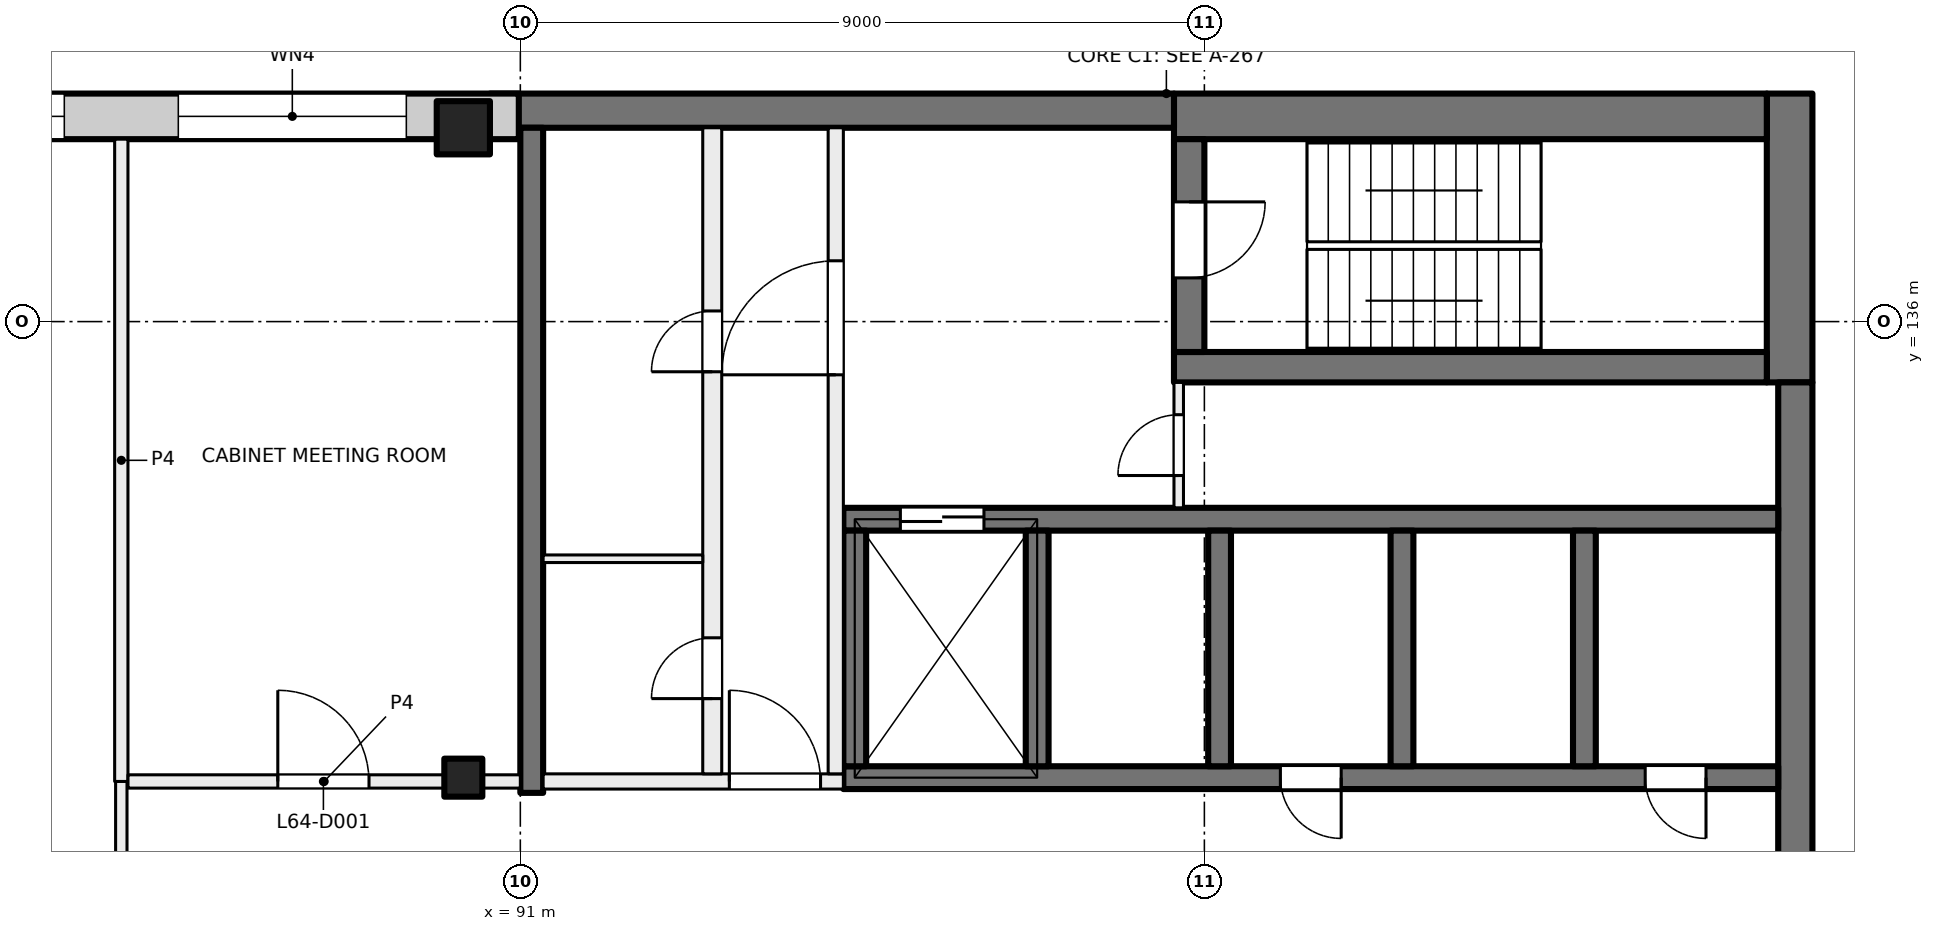
"""IFC4 building model, lengths in metres.
Left out: names, types, materials, properties, quantities, classifications, styles, units other than length and angle.
Written with IfcOpenShell. Run it as: python <this file> out.ifc"""

import sys

from ifc_helpers import new_model, si_unit, direction, frame, frame_2d, origin, origin_2d, place, context, subcontext, project, spatial, rectangle, extrude, element, fill, save


model = new_model("IFC4")
c1 = context("Model", 3, precision=1e-05, world=origin(), true_north=direction((0.0, 1.0)))
c2 = subcontext(c1, "Body", "Model", "MODEL_VIEW")
j1 = project(units=[si_unit("LENGTHUNIT", "METRE"), si_unit("PLANEANGLEUNIT", "RADIAN")], contexts=[c1])
p1 = place(None, origin())
s1 = spatial("IfcSite", under=j1, at=p1, CompositionType="ELEMENT")
p2 = place(p1, origin())
s2 = spatial("IfcBuilding", under=s1, at=p2, CompositionType="ELEMENT")
p3 = place(p2, frame((0.0, 0.0, 269.5)))
s3 = spatial("IfcBuildingStorey", under=s2, at=p3, CompositionType="ELEMENT", Elevation=269.5)
p4 = place(p3, frame((90.25, 130.0, 0.0), z_axis=(0.0, 0.0, 1.0), x_axis=(1.0, 0.0, 0.0)))
e1 = element("IfcColumn", 1, at=p4, inside=s3, PredefinedType="COLUMN", context=c2, shape_type="SweptSolid", body=[
    extrude(rectangle(XDim=0.5, YDim=0.5, at=origin_2d()), origin(), (0.0, 0.0, 1.0), 4.0),
])
p5 = place(p3, frame((90.25, 138.55, 0.0), z_axis=(0.0, 0.0, 1.0), x_axis=(1.0, 0.0, 0.0)))
e2 = element("IfcColumn", 2, at=p5, inside=s3, PredefinedType="COLUMN", context=c2, shape_type="SweptSolid", body=[
    extrude(rectangle(XDim=0.7, YDim=0.7, at=origin_2d()), origin(), (0.0, 0.0, 1.0), 4.0),
])
p6 = place(p3, frame((107.7, 139.0, 0.0), z_axis=(0.0, 0.0, 1.0), x_axis=(0.0, -1.0, 0.0)))
e3 = element("IfcWall", 3, at=p6, inside=s3, PredefinedType="SHEAR", context=c2, shape_type="SweptSolid", body=[
    extrude(rectangle(XDim=3.8, YDim=0.6, at=frame_2d((1.9, 0.0))), origin(), (0.0, 0.0, 1.0), 4.0),
])
p7 = place(p3, frame((107.775, 135.2, 0.0), z_axis=(0.0, 0.0, 1.0), x_axis=(0.0, -1.0, 0.0)))
e4 = element("IfcWall", 4, at=p7, inside=s3, PredefinedType="SHEAR", context=c2, shape_type="SweptSolid", body=[
    extrude(rectangle(XDim=14.4, YDim=0.45, at=frame_2d((7.2, 0.0))), origin(), (0.0, 0.0, 1.0), 4.0),
])
p8 = place(p3, frame((107.4, 138.7, 0.0), z_axis=(0.0, 0.0, 1.0), x_axis=(-1.0, 0.0, 0.0)))
e5 = element("IfcWall", 5, at=p8, inside=s3, PredefinedType="SHEAR", context=c2, shape_type="SweptSolid", body=[
    extrude(rectangle(XDim=7.8, YDim=0.6, at=frame_2d((3.9, 0.0))), origin(), (0.0, 0.0, 1.0), 4.0),
])
p9 = place(p3, frame((99.6, 138.775, 0.0), z_axis=(0.0, 0.0, 1.0), x_axis=(-1.0, 0.0, 0.0)))
e6 = element("IfcWall", 6, at=p9, inside=s3, PredefinedType="SHEAR", context=c2, shape_type="SweptSolid", body=[
    extrude(rectangle(XDim=9.0, YDim=0.45, at=frame_2d((4.5, 0.0))), origin(), (0.0, 0.0, 1.0), 4.0),
])
p10 = place(p3, frame((107.4, 135.4, 0.0), z_axis=(0.0, 0.0, 1.0), x_axis=(-1.0, 0.0, 0.0)))
e7 = element("IfcWall", 7, at=p10, inside=s3, PredefinedType="SHEAR", context=c2, shape_type="SweptSolid", body=[
    extrude(rectangle(XDim=7.8, YDim=0.4, at=frame_2d((3.9, 0.0))), origin(), (0.0, 0.0, 1.0), 4.0),
])
p11 = place(p3, frame((99.8, 138.4, 0.0), z_axis=(0.0, 0.0, 1.0), x_axis=(0.0, -1.0, 0.0)))
e8 = element("IfcWall", 8, at=p11, inside=s3, PredefinedType="SHEAR", context=c2, shape_type="SweptSolid", body=[
    extrude(rectangle(XDim=2.8, YDim=0.4, at=frame_2d((1.4, 0.0))), origin(), (0.0, 0.0, 1.0), 4.0),
])
p12 = place(p11, frame((0.825, 0.0, 0.0)))
e9 = element("IfcOpeningElement", 9, at=p12, cuts=e8, PredefinedType="OPENING", context=c2, shape_type="SweptSolid", body=[
    extrude(rectangle(XDim=1.0, YDim=2.1, at=frame_2d((0.5, 1.05))), frame((0.0, 0.21, 0.0), z_axis=(0.0, -1.0, 0.0), x_axis=(1.0, 0.0, 0.0)), (0.0, 0.0, 1.0), 0.42),
])
p13 = place(p3, frame((107.55, 130.0, 0.0), z_axis=(0.0, 0.0, 1.0), x_axis=(-1.0, 0.0, 0.0)))
e10 = element("IfcWall", 10, at=p13, inside=s3, PredefinedType="SHEAR", context=c2, shape_type="SweptSolid", body=[
    extrude(rectangle(XDim=12.3, YDim=0.3, at=frame_2d((6.15, 0.0))), origin(), (0.0, 0.0, 1.0), 4.0),
])
p14 = place(p13, frame((0.95, 0.0, 0.0)))
e11 = element("IfcOpeningElement", 11, at=p14, cuts=e10, PredefinedType="OPENING", context=c2, shape_type="SweptSolid", body=[
    extrude(rectangle(XDim=0.8, YDim=2.1, at=frame_2d((0.4, 1.05))), frame((0.0, 0.16, 0.0), z_axis=(0.0, -1.0, 0.0), x_axis=(1.0, 0.0, 0.0)), (0.0, 0.0, 1.0), 0.32),
])
p15 = place(p13, frame((5.75, 0.0, 0.0)))
e12 = element("IfcOpeningElement", 12, at=p15, cuts=e10, PredefinedType="OPENING", context=c2, shape_type="SweptSolid", body=[
    extrude(rectangle(XDim=0.8, YDim=2.1, at=frame_2d((0.4, 1.05))), frame((0.0, 0.16, 0.0), z_axis=(0.0, -1.0, 0.0), x_axis=(1.0, 0.0, 0.0)), (0.0, 0.0, 1.0), 0.32),
])
p16 = place(p3, frame((107.55, 133.4, 0.0), z_axis=(0.0, 0.0, 1.0), x_axis=(-1.0, 0.0, 0.0)))
e13 = element("IfcWall", 13, at=p16, inside=s3, PredefinedType="SHEAR", context=c2, shape_type="SweptSolid", body=[
    extrude(rectangle(XDim=12.3, YDim=0.3, at=frame_2d((6.15, 0.0))), origin(), (0.0, 0.0, 1.0), 4.0),
])
p17 = place(p16, frame((10.45, 0.0, 0.0)))
e14 = element("IfcOpeningElement", 14, at=p17, cuts=e13, PredefinedType="OPENING", context=c2, shape_type="SweptSolid", body=[
    extrude(rectangle(XDim=1.1, YDim=2.1, at=frame_2d((0.55, 1.05))), frame((0.0, 0.16, 0.0), z_axis=(0.0, -1.0, 0.0), x_axis=(1.0, 0.0, 0.0)), (0.0, 0.0, 1.0), 0.32),
])
for number, where, z_axis, x_axis in (
    (15, (105.0, 133.25, 0.0), (0.0, 0.0, 1.0), (0.0, -1.0, 0.0)),
    (16, (102.6, 133.25, 0.0), (0.0, 0.0, 1.0), (0.0, -1.0, 0.0)),
    (17, (100.2, 133.25, 0.0), (0.0, 0.0, 1.0), (0.0, -1.0, 0.0)),
    (18, (97.8, 133.25, 0.0), (0.0, 0.0, 1.0), (0.0, -1.0, 0.0)),
    (19, (95.4, 133.25, 0.0), (0.0, 0.0, 1.0), (0.0, -1.0, 0.0)),
):
    element("IfcWall", number, at=place(p3, frame(where, z_axis=z_axis, x_axis=x_axis)), inside=s3, PredefinedType="SHEAR", context=c2, shape_type="SweptSolid", body=[
        extrude(rectangle(XDim=3.1, YDim=0.3, at=frame_2d((1.55, 0.0))), origin(), (0.0, 0.0, 1.0), 4.0),
    ])
p18 = place(p3, frame((91.15, 138.55, 0.0), z_axis=(0.0, 0.0, 1.0), x_axis=(0.0, -1.0, 0.0)))
e20 = element("IfcWall", 20, at=p18, inside=s3, PredefinedType="SHEAR", context=c2, shape_type="SweptSolid", body=[
    extrude(rectangle(XDim=8.75, YDim=0.3, at=frame_2d((4.375, 0.0))), origin(), (0.0, 0.0, 1.0), 4.0),
])
p19 = place(p3, frame((47.07, 138.7, 0.0), z_axis=(0.0, 0.0, 1.0), x_axis=(1.0, 0.0, 0.0)))
e21 = element("IfcWall", 21, at=p19, inside=s3, PredefinedType="SOLIDWALL", context=c2, shape_type="SweptSolid", body=[
    extrude(rectangle(XDim=43.91, YDim=0.6, at=frame_2d((21.955, 0.0))), origin(), (0.0, 0.0, 1.0), 3.625),
])
p20 = place(p19, frame((3.43, 0.0, 0.9)))
e22 = element("IfcOpeningElement", 22, at=p20, cuts=e21, PredefinedType="OPENING", context=c2, shape_type="SweptSolid", body=[
    extrude(rectangle(XDim=3.0, YDim=2.4, at=frame_2d((1.5, 1.2))), frame((0.0, 0.31, 0.0), z_axis=(0.0, -1.0, 0.0), x_axis=(1.0, 0.0, 0.0)), (0.0, 0.0, 1.0), 0.62),
])
p21 = place(p19, frame((7.93, 0.0, 0.9)))
e23 = element("IfcOpeningElement", 23, at=p21, cuts=e21, PredefinedType="OPENING", context=c2, shape_type="SweptSolid", body=[
    extrude(rectangle(XDim=3.0, YDim=2.4, at=frame_2d((1.5, 1.2))), frame((0.0, 0.31, 0.0), z_axis=(0.0, -1.0, 0.0), x_axis=(1.0, 0.0, 0.0)), (0.0, 0.0, 1.0), 0.62),
])
p22 = place(p19, frame((12.43, 0.0, 0.9)))
e24 = element("IfcOpeningElement", 24, at=p22, cuts=e21, PredefinedType="OPENING", context=c2, shape_type="SweptSolid", body=[
    extrude(rectangle(XDim=3.0, YDim=2.4, at=frame_2d((1.5, 1.2))), frame((0.0, 0.31, 0.0), z_axis=(0.0, -1.0, 0.0), x_axis=(1.0, 0.0, 0.0)), (0.0, 0.0, 1.0), 0.62),
])
p23 = place(p19, frame((16.93, 0.0, 0.9)))
e25 = element("IfcOpeningElement", 25, at=p23, cuts=e21, PredefinedType="OPENING", context=c2, shape_type="SweptSolid", body=[
    extrude(rectangle(XDim=3.0, YDim=2.4, at=frame_2d((1.5, 1.2))), frame((0.0, 0.31, 0.0), z_axis=(0.0, -1.0, 0.0), x_axis=(1.0, 0.0, 0.0)), (0.0, 0.0, 1.0), 0.62),
])
p24 = place(p19, frame((21.43, 0.0, 0.9)))
e26 = element("IfcOpeningElement", 26, at=p24, cuts=e21, PredefinedType="OPENING", context=c2, shape_type="SweptSolid", body=[
    extrude(rectangle(XDim=3.0, YDim=2.4, at=frame_2d((1.5, 1.2))), frame((0.0, 0.31, 0.0), z_axis=(0.0, -1.0, 0.0), x_axis=(1.0, 0.0, 0.0)), (0.0, 0.0, 1.0), 0.62),
])
p25 = place(p19, frame((25.93, 0.0, 0.9)))
e27 = element("IfcOpeningElement", 27, at=p25, cuts=e21, PredefinedType="OPENING", context=c2, shape_type="SweptSolid", body=[
    extrude(rectangle(XDim=3.0, YDim=2.4, at=frame_2d((1.5, 1.2))), frame((0.0, 0.31, 0.0), z_axis=(0.0, -1.0, 0.0), x_axis=(1.0, 0.0, 0.0)), (0.0, 0.0, 1.0), 0.62),
])
p26 = place(p19, frame((30.43, 0.0, 0.9)))
e28 = element("IfcOpeningElement", 28, at=p26, cuts=e21, PredefinedType="OPENING", context=c2, shape_type="SweptSolid", body=[
    extrude(rectangle(XDim=3.0, YDim=2.4, at=frame_2d((1.5, 1.2))), frame((0.0, 0.31, 0.0), z_axis=(0.0, -1.0, 0.0), x_axis=(1.0, 0.0, 0.0)), (0.0, 0.0, 1.0), 0.62),
])
p27 = place(p19, frame((34.93, 0.0, 0.9)))
e29 = element("IfcOpeningElement", 29, at=p27, cuts=e21, PredefinedType="OPENING", context=c2, shape_type="SweptSolid", body=[
    extrude(rectangle(XDim=3.0, YDim=2.4, at=frame_2d((1.5, 1.2))), frame((0.0, 0.31, 0.0), z_axis=(0.0, -1.0, 0.0), x_axis=(1.0, 0.0, 0.0)), (0.0, 0.0, 1.0), 0.62),
])
p28 = place(p19, frame((39.43, 0.0, 0.9)))
e30 = element("IfcOpeningElement", 30, at=p28, cuts=e21, PredefinedType="OPENING", context=c2, shape_type="SweptSolid", body=[
    extrude(rectangle(XDim=3.0, YDim=2.4, at=frame_2d((1.5, 1.2))), frame((0.0, 0.31, 0.0), z_axis=(0.0, -1.0, 0.0), x_axis=(1.0, 0.0, 0.0)), (0.0, 0.0, 1.0), 0.62),
])
p29 = place(p3, frame((91.3, 129.95, 0.0), z_axis=(0.0, 0.0, 1.0), x_axis=(1.0, 0.0, 0.0)))
e31 = element("IfcWall", 31, at=p29, inside=s3, PredefinedType="PARTITIONING", context=c2, shape_type="SweptSolid", body=[
    extrude(rectangle(XDim=3.95, YDim=0.2, at=frame_2d((1.975, 0.0))), origin(), (0.0, 0.0, 1.0), 3.625),
])
p30 = place(p29, frame((2.45, 0.0, 0.0)))
e32 = element("IfcOpeningElement", 32, at=p30, cuts=e31, PredefinedType="OPENING", context=c2, shape_type="SweptSolid", body=[
    extrude(rectangle(XDim=1.2, YDim=2.1, at=frame_2d((0.6, 1.05))), frame((0.0, 0.11, 0.0), z_axis=(0.0, -1.0, 0.0), x_axis=(1.0, 0.0, 0.0)), (0.0, 0.0, 1.0), 0.22),
])
p31 = place(p3, frame((95.15, 130.05, 0.0), z_axis=(0.0, 0.0, 1.0), x_axis=(0.0, 1.0, 0.0)))
e33 = element("IfcWall", 33, at=p31, inside=s3, PredefinedType="PARTITIONING", context=c2, shape_type="SweptSolid", body=[
    extrude(rectangle(XDim=8.5, YDim=0.2, at=frame_2d((4.25, 0.0))), origin(), (0.0, 0.0, 1.0), 3.625),
])
p32 = place(p31, frame((5.25, 0.0, 0.0)))
e34 = element("IfcOpeningElement", 34, at=p32, cuts=e33, PredefinedType="OPENING", context=c2, shape_type="SweptSolid", body=[
    extrude(rectangle(XDim=1.5, YDim=2.1, at=frame_2d((0.75, 1.05))), frame((0.0, 0.11, 0.0), z_axis=(0.0, -1.0, 0.0), x_axis=(1.0, 0.0, 0.0)), (0.0, 0.0, 1.0), 0.22),
])
p33 = place(p3, frame((93.525, 130.05, 0.0), z_axis=(0.0, 0.0, 1.0), x_axis=(0.0, 1.0, 0.0)))
e35 = element("IfcWall", 35, at=p33, inside=s3, PredefinedType="PARTITIONING", context=c2, shape_type="SweptSolid", body=[
    extrude(rectangle(XDim=8.5, YDim=0.25, at=frame_2d((4.25, 0.0))), origin(), (0.0, 0.0, 1.0), 3.625),
])
p34 = place(p33, frame((0.99, 0.0, 0.0)))
e36 = element("IfcOpeningElement", 36, at=p34, cuts=e35, PredefinedType="OPENING", context=c2, shape_type="SweptSolid", body=[
    extrude(rectangle(XDim=0.8, YDim=2.1, at=frame_2d((0.4, 1.05))), frame((0.0, 0.135, 0.0), z_axis=(0.0, -1.0, 0.0), x_axis=(1.0, 0.0, 0.0)), (0.0, 0.0, 1.0), 0.27),
])
p35 = place(p33, frame((5.29, 0.0, 0.0)))
e37 = element("IfcOpeningElement", 37, at=p35, cuts=e35, PredefinedType="OPENING", context=c2, shape_type="SweptSolid", body=[
    extrude(rectangle(XDim=0.8, YDim=2.1, at=frame_2d((0.4, 1.05))), frame((0.0, 0.135, 0.0), z_axis=(0.0, -1.0, 0.0), x_axis=(1.0, 0.0, 0.0)), (0.0, 0.0, 1.0), 0.27),
])
p36 = place(p3, frame((99.663, 133.55, 0.0), z_axis=(0.0, 0.0, 1.0), x_axis=(0.0, 1.0, 0.0)))
e38 = element("IfcWall", 38, at=p36, inside=s3, PredefinedType="PARTITIONING", context=c2, shape_type="SweptSolid", body=[
    extrude(rectangle(XDim=1.65, YDim=0.125, at=frame_2d((0.825, 0.0))), origin(), (0.0, 0.0, 1.0), 3.625),
])
p37 = place(p36, frame((0.425, 0.0, 0.0)))
e39 = element("IfcOpeningElement", 39, at=p37, cuts=e38, PredefinedType="OPENING", context=c2, shape_type="SweptSolid", body=[
    extrude(rectangle(XDim=0.8, YDim=2.1, at=frame_2d((0.4, 1.05))), frame((0.0, 0.073, 0.0), z_axis=(0.0, -1.0, 0.0), x_axis=(1.0, 0.0, 0.0)), (0.0, 0.0, 1.0), 0.145),
])
p38 = place(p3, frame((91.3, 132.88, 0.0), z_axis=(0.0, 0.0, 1.0), x_axis=(1.0, 0.0, 0.0)))
e40 = element("IfcWall", 40, at=p38, inside=s3, PredefinedType="PARTITIONING", context=c2, shape_type="SweptSolid", body=[
    extrude(rectangle(XDim=2.1, YDim=0.1, at=frame_2d((1.05, 0.0))), origin(), (0.0, 0.0, 1.0), 3.625),
])
p39 = place(p3, frame((85.75, 121.5, 0.0), z_axis=(0.0, 0.0, 1.0), x_axis=(0.0, 1.0, 0.0)))
e41 = element("IfcWall", 41, at=p39, inside=s3, PredefinedType="PARTITIONING", context=c2, shape_type="SweptSolid", body=[
    extrude(rectangle(XDim=8.45, YDim=0.15, at=frame_2d((4.225, 0.0))), origin(), (0.0, 0.0, 1.0), 3.625),
])
p40 = place(p3, frame((85.75, 129.95, 0.0), z_axis=(0.0, 0.0, 1.0), x_axis=(0.0, 1.0, 0.0)))
e42 = element("IfcWall", 42, at=p40, inside=s3, PredefinedType="PARTITIONING", context=c2, shape_type="SweptSolid", body=[
    extrude(rectangle(XDim=8.45, YDim=0.175, at=frame_2d((4.225, 0.0))), origin(), (0.0, 0.0, 1.0), 3.625),
])
p41 = place(p3, frame((85.838, 129.95, 0.0), z_axis=(0.0, 0.0, 1.0), x_axis=(1.0, 0.0, 0.0)))
e43 = element("IfcWall", 43, at=p41, inside=s3, PredefinedType="PARTITIONING", context=c2, shape_type="SweptSolid", body=[
    extrude(rectangle(XDim=5.162, YDim=0.175, at=frame_2d((2.581, 0.0))), origin(), (0.0, 0.0, 1.0), 3.625),
])
p42 = place(p41, frame((1.971, 0.0, 0.0)))
e44 = element("IfcOpeningElement", 44, at=p42, cuts=e43, PredefinedType="OPENING", context=c2, shape_type="SweptSolid", body=[
    extrude(rectangle(XDim=1.2, YDim=2.1, at=frame_2d((0.6, 1.05))), frame((0.0, 0.097, 0.0), z_axis=(0.0, -1.0, 0.0), x_axis=(1.0, 0.0, 0.0)), (0.0, 0.0, 1.0), 0.195),
])
p43 = place(p27, origin())
e45 = element("IfcWindow", 45, at=p43, inside=s3, PartitioningType="SINGLE_PANEL", PredefinedType="WINDOW", context=c2, shape_type="SweptSolid", body=[
    extrude(rectangle(XDim=3.0, YDim=2.4, at=frame_2d((1.5, 1.2))), frame((0.0, 0.03, 0.0), z_axis=(0.0, -1.0, 0.0), x_axis=(1.0, 0.0, 0.0)), (0.0, 0.0, 1.0), 0.06),
])
fill(e29, e45)
p44 = place(p28, origin())
e46 = element("IfcWindow", 46, at=p44, inside=s3, PartitioningType="SINGLE_PANEL", PredefinedType="WINDOW", context=c2, shape_type="SweptSolid", body=[
    extrude(rectangle(XDim=3.0, YDim=2.4, at=frame_2d((1.5, 1.2))), frame((0.0, 0.03, 0.0), z_axis=(0.0, -1.0, 0.0), x_axis=(1.0, 0.0, 0.0)), (0.0, 0.0, 1.0), 0.06),
])
fill(e30, e46)
p45 = place(p14, origin())
e47 = element("IfcDoor", 47, at=p45, inside=s3, OperationType="SINGLE_SWING_LEFT", PredefinedType="DOOR", context=c2, shape_type="SweptSolid", body=[
    extrude(rectangle(XDim=0.8, YDim=2.1, at=frame_2d((0.4, 1.05))), frame((0.0, 0.025, 0.0), z_axis=(0.0, -1.0, 0.0), x_axis=(1.0, 0.0, 0.0)), (0.0, 0.0, 1.0), 0.05),
])
fill(e11, e47)
p46 = place(p15, origin())
e48 = element("IfcDoor", 48, at=p46, inside=s3, OperationType="SINGLE_SWING_RIGHT", PredefinedType="DOOR", context=c2, shape_type="SweptSolid", body=[
    extrude(rectangle(XDim=0.8, YDim=2.1, at=frame_2d((0.4, 1.05))), frame((0.0, 0.025, 0.0), z_axis=(0.0, -1.0, 0.0), x_axis=(1.0, 0.0, 0.0)), (0.0, 0.0, 1.0), 0.05),
])
fill(e12, e48)
p47 = place(p30, origin())
e49 = element("IfcDoor", 49, at=p47, inside=s3, OperationType="DOUBLE_DOOR_SINGLE_SWING", PredefinedType="DOOR", context=c2, shape_type="SweptSolid", body=[
    extrude(rectangle(XDim=1.2, YDim=2.1, at=frame_2d((0.6, 1.05))), frame((0.0, 0.025, 0.0), z_axis=(0.0, -1.0, 0.0), x_axis=(1.0, 0.0, 0.0)), (0.0, 0.0, 1.0), 0.05),
])
fill(e32, e49)
p48 = place(p32, origin())
e50 = element("IfcDoor", 50, at=p48, inside=s3, OperationType="DOUBLE_DOOR_SINGLE_SWING", PredefinedType="DOOR", context=c2, shape_type="SweptSolid", body=[
    extrude(rectangle(XDim=1.5, YDim=2.1, at=frame_2d((0.75, 1.05))), frame((0.0, 0.025, 0.0), z_axis=(0.0, -1.0, 0.0), x_axis=(1.0, 0.0, 0.0)), (0.0, 0.0, 1.0), 0.05),
])
fill(e34, e50)
p49 = place(p12, origin())
e51 = element("IfcDoor", 51, at=p49, inside=s3, OperationType="SINGLE_SWING_RIGHT", PredefinedType="DOOR", context=c2, shape_type="SweptSolid", body=[
    extrude(rectangle(XDim=1.0, YDim=2.1, at=frame_2d((0.5, 1.05))), frame((0.0, 0.025, 0.0), z_axis=(0.0, -1.0, 0.0), x_axis=(1.0, 0.0, 0.0)), (0.0, 0.0, 1.0), 0.05),
])
fill(e9, e51)
p50 = place(p37, origin())
e52 = element("IfcDoor", 52, at=p50, inside=s3, OperationType="SINGLE_SWING_LEFT", PredefinedType="DOOR", context=c2, shape_type="SweptSolid", body=[
    extrude(rectangle(XDim=0.8, YDim=2.1, at=frame_2d((0.4, 1.05))), frame((0.0, 0.025, 0.0), z_axis=(0.0, -1.0, 0.0), x_axis=(1.0, 0.0, 0.0)), (0.0, 0.0, 1.0), 0.05),
])
fill(e39, e52)
p51 = place(p34, origin())
e53 = element("IfcDoor", 53, at=p51, inside=s3, OperationType="SINGLE_SWING_RIGHT", PredefinedType="DOOR", context=c2, shape_type="SweptSolid", body=[
    extrude(rectangle(XDim=0.8, YDim=2.1, at=frame_2d((0.4, 1.05))), frame((0.0, 0.025, 0.0), z_axis=(0.0, -1.0, 0.0), x_axis=(1.0, 0.0, 0.0)), (0.0, 0.0, 1.0), 0.05),
])
fill(e36, e53)
p52 = place(p35, origin())
e54 = element("IfcDoor", 54, at=p52, inside=s3, OperationType="SINGLE_SWING_LEFT", PredefinedType="DOOR", context=c2, shape_type="SweptSolid", body=[
    extrude(rectangle(XDim=0.8, YDim=2.1, at=frame_2d((0.4, 1.05))), frame((0.0, 0.025, 0.0), z_axis=(0.0, -1.0, 0.0), x_axis=(1.0, 0.0, 0.0)), (0.0, 0.0, 1.0), 0.05),
])
fill(e37, e54)
p53 = place(p17, origin())
e55 = element("IfcDoor", 55, at=p53, inside=s3, OperationType="DOUBLE_DOOR_SLIDING", PredefinedType="DOOR", context=c2, shape_type="SweptSolid", body=[
    extrude(rectangle(XDim=1.1, YDim=2.1, at=frame_2d((0.55, 1.05))), frame((0.0, 0.025, 0.0), z_axis=(0.0, -1.0, 0.0), x_axis=(1.0, 0.0, 0.0)), (0.0, 0.0, 1.0), 0.05),
])
fill(e14, e55)
p54 = place(p42, origin())
e56 = element("IfcDoor", 56, at=p54, inside=s3, OperationType="DOUBLE_DOOR_SINGLE_SWING", PredefinedType="DOOR", context=c2, shape_type="SweptSolid", body=[
    extrude(rectangle(XDim=1.2, YDim=2.1, at=frame_2d((0.6, 1.05))), frame((0.0, 0.025, 0.0), z_axis=(0.0, -1.0, 0.0), x_axis=(1.0, 0.0, 0.0)), (0.0, 0.0, 1.0), 0.05),
])
fill(e44, e56)
save(model, sys.argv[1])
